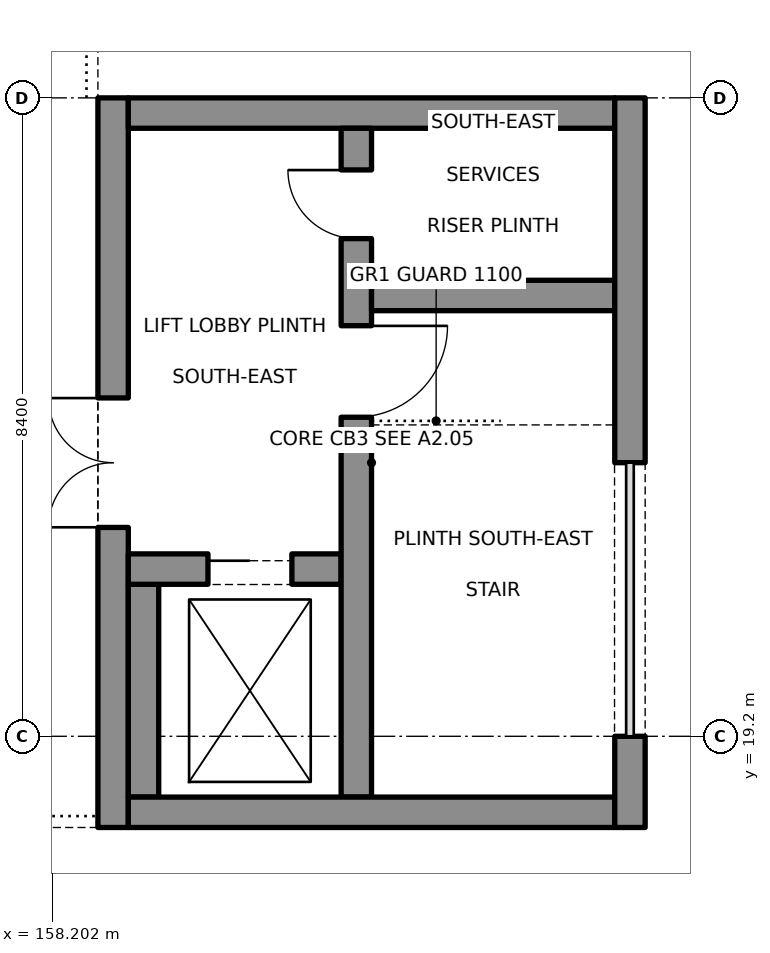
"""IFC4 building model, lengths in metres.
Left out: names, types, materials, properties, quantities, classifications, styles, units other than length and angle.
Written with IfcOpenShell. Run it as: python <this file> out.ifc"""

import sys

from ifc_helpers import new_model, si_unit, direction, frame, frame_2d, origin, place, context, subcontext, project, spatial, rectangle, extrude, element, fill, save


model = new_model("IFC4")
c1 = context("Model", 3, precision=1e-05, world=origin(), true_north=direction((0.0, 1.0)))
c2 = subcontext(c1, "Body", "Model", "MODEL_VIEW")
j1 = project(units=[si_unit("LENGTHUNIT", "METRE"), si_unit("PLANEANGLEUNIT", "RADIAN")], contexts=[c1])
p1 = place(None, origin())
s1 = spatial("IfcSite", under=j1, at=p1, CompositionType="ELEMENT")
p2 = place(p1, origin())
s2 = spatial("IfcBuilding", under=s1, at=p2, CompositionType="ELEMENT")
p3 = place(p2, frame((0.0, 0.0, 14.0)))
s3 = spatial("IfcBuildingStorey", under=s2, at=p3, CompositionType="ELEMENT", Elevation=14.0)
p4 = place(p3, frame((165.8, 19.2, 0.0), z_axis=(0.0, 0.0, 1.0), x_axis=(0.0, -1.0, 0.0)))
e1 = element("IfcWall", 1, at=p4, inside=s3, PredefinedType="SHEAR", context=c2, shape_type="SweptSolid", body=[
    extrude(rectangle(XDim=1.2, YDim=0.4, at=frame_2d((0.6, 0.0))), origin(), (0.0, 0.0, 1.0), 4.2),
])
p5 = place(p3, frame((165.8, 27.6, 0.0), z_axis=(0.0, 0.0, 1.0), x_axis=(0.0, -1.0, 0.0)))
e2 = element("IfcWall", 2, at=p5, inside=s3, PredefinedType="SHEAR", context=c2, shape_type="SweptSolid", body=[
    extrude(rectangle(XDim=4.8, YDim=0.4, at=frame_2d((2.4, 0.0))), origin(), (0.0, 0.0, 1.0), 4.2),
])
p6 = place(p3, frame((159.0, 18.0, 0.0), z_axis=(0.0, 0.0, 1.0), x_axis=(0.0, 1.0, 0.0)))
e3 = element("IfcWall", 3, at=p6, inside=s3, PredefinedType="SHEAR", context=c2, shape_type="SweptSolid", body=[
    extrude(rectangle(XDim=9.6, YDim=0.4, at=frame_2d((4.8, 0.0))), origin(), (0.0, 0.0, 1.0), 4.2),
])
p7 = place(p6, frame((3.95, 0.0, 0.0)))
e4 = element("IfcOpeningElement", 4, at=p7, cuts=e3, PredefinedType="OPENING", context=c2, shape_type="SweptSolid", body=[
    extrude(rectangle(XDim=1.7, YDim=2.1, at=frame_2d((0.85, 1.05))), frame((0.0, 0.21, 0.0), z_axis=(0.0, -1.0, 0.0), x_axis=(1.0, 0.0, 0.0)), (0.0, 0.0, 1.0), 0.42),
])
for number, where, z_axis, x_axis in (
    (5, (159.2, 18.2, 0.0), (0.0, 0.0, 1.0), (1.0, 0.0, 0.0)),
    (6, (159.2, 27.4, 0.0), (0.0, 0.0, 1.0), (1.0, 0.0, 0.0)),
):
    element("IfcWall", number, at=place(p3, frame(where, z_axis=z_axis, x_axis=x_axis)), inside=s3, PredefinedType="SHEAR", context=c2, shape_type="SweptSolid", body=[
        extrude(rectangle(XDim=6.4, YDim=0.4, at=frame_2d((3.2, 0.0))), origin(), (0.0, 0.0, 1.0), 4.2),
    ])
p8 = place(p3, frame((162.2, 18.4, 0.0), z_axis=(0.0, 0.0, 1.0), x_axis=(0.0, 1.0, 0.0)))
e7 = element("IfcWall", 7, at=p8, inside=s3, PredefinedType="SHEAR", context=c2, shape_type="SweptSolid", body=[
    extrude(rectangle(XDim=8.8, YDim=0.4, at=frame_2d((4.4, 0.0))), origin(), (0.0, 0.0, 1.0), 4.2),
])
p9 = place(p8, frame((5.0, 0.0, 0.0)))
e8 = element("IfcOpeningElement", 8, at=p9, cuts=e7, PredefinedType="OPENING", context=c2, shape_type="SweptSolid", body=[
    extrude(rectangle(XDim=1.2, YDim=2.1, at=frame_2d((0.6, 1.05))), frame((0.0, 0.21, 0.0), z_axis=(0.0, -1.0, 0.0), x_axis=(1.0, 0.0, 0.0)), (0.0, 0.0, 1.0), 0.42),
])
p10 = place(p8, frame((7.35, 0.0, 0.0)))
e9 = element("IfcOpeningElement", 9, at=p10, cuts=e7, PredefinedType="OPENING", context=c2, shape_type="SweptSolid", body=[
    extrude(rectangle(XDim=0.9, YDim=2.1, at=frame_2d((0.45, 1.05))), frame((0.0, 0.21, 0.0), z_axis=(0.0, -1.0, 0.0), x_axis=(1.0, 0.0, 0.0)), (0.0, 0.0, 1.0), 0.42),
])
p11 = place(p3, frame((162.4, 25.0, 0.0), z_axis=(0.0, 0.0, 1.0), x_axis=(1.0, 0.0, 0.0)))
e10 = element("IfcWall", 10, at=p11, inside=s3, PredefinedType="SHEAR", context=c2, shape_type="SweptSolid", body=[
    extrude(rectangle(XDim=3.2, YDim=0.4, at=frame_2d((1.6, 0.0))), origin(), (0.0, 0.0, 1.0), 4.2),
])
p12 = place(p3, frame((159.2, 21.4, 0.0), z_axis=(0.0, 0.0, 1.0), x_axis=(1.0, 0.0, 0.0)))
e11 = element("IfcWall", 11, at=p12, inside=s3, PredefinedType="SHEAR", context=c2, shape_type="SweptSolid", body=[
    extrude(rectangle(XDim=2.8, YDim=0.4, at=frame_2d((1.4, 0.0))), origin(), (0.0, 0.0, 1.0), 4.2),
])
p13 = place(p12, frame((1.05, 0.0, 0.0)))
e12 = element("IfcOpeningElement", 12, at=p13, cuts=e11, PredefinedType="OPENING", context=c2, shape_type="SweptSolid", body=[
    extrude(rectangle(XDim=1.1, YDim=2.1, at=frame_2d((0.55, 1.05))), frame((0.0, 0.21, 0.0), z_axis=(0.0, -1.0, 0.0), x_axis=(1.0, 0.0, 0.0)), (0.0, 0.0, 1.0), 0.42),
])
p14 = place(p3, frame((159.4, 18.4, 0.0), z_axis=(0.0, 0.0, 1.0), x_axis=(0.0, 1.0, 0.0)))
e13 = element("IfcWall", 13, at=p14, inside=s3, PredefinedType="SHEAR", context=c2, shape_type="SweptSolid", body=[
    extrude(rectangle(XDim=2.8, YDim=0.4, at=frame_2d((1.4, 0.0))), origin(), (0.0, 0.0, 1.0), 4.2),
])
p15 = place(p7, origin())
e14 = element("IfcDoor", 14, at=p15, inside=s3, OperationType="DOUBLE_DOOR_SINGLE_SWING", PredefinedType="DOOR", context=c2, shape_type="SweptSolid", body=[
    extrude(rectangle(XDim=1.7, YDim=2.1, at=frame_2d((0.85, 1.05))), frame((0.0, 0.025, 0.0), z_axis=(0.0, -1.0, 0.0), x_axis=(1.0, 0.0, 0.0)), (0.0, 0.0, 1.0), 0.05),
])
fill(e4, e14)
p16 = place(p9, origin())
e15 = element("IfcDoor", 15, at=p16, inside=s3, OperationType="SINGLE_SWING_RIGHT", PredefinedType="DOOR", context=c2, shape_type="SweptSolid", body=[
    extrude(rectangle(XDim=1.2, YDim=2.1, at=frame_2d((0.6, 1.05))), frame((0.0, 0.025, 0.0), z_axis=(0.0, -1.0, 0.0), x_axis=(1.0, 0.0, 0.0)), (0.0, 0.0, 1.0), 0.05),
])
fill(e8, e15)
p17 = place(p10, origin())
e16 = element("IfcDoor", 16, at=p17, inside=s3, OperationType="SINGLE_SWING_RIGHT", PredefinedType="DOOR", context=c2, shape_type="SweptSolid", body=[
    extrude(rectangle(XDim=0.9, YDim=2.1, at=frame_2d((0.45, 1.05))), frame((0.0, 0.025, 0.0), z_axis=(0.0, -1.0, 0.0), x_axis=(1.0, 0.0, 0.0)), (0.0, 0.0, 1.0), 0.05),
])
fill(e9, e16)
p18 = place(p13, origin())
e17 = element("IfcDoor", 17, at=p18, inside=s3, OperationType="SLIDING_TO_RIGHT", PredefinedType="DOOR", context=c2, shape_type="SweptSolid", body=[
    extrude(rectangle(XDim=1.1, YDim=2.1, at=frame_2d((0.55, 1.05))), frame((0.0, 0.025, 0.0), z_axis=(0.0, -1.0, 0.0), x_axis=(1.0, 0.0, 0.0)), (0.0, 0.0, 1.0), 0.05),
])
fill(e12, e17)
save(model, sys.argv[1])
